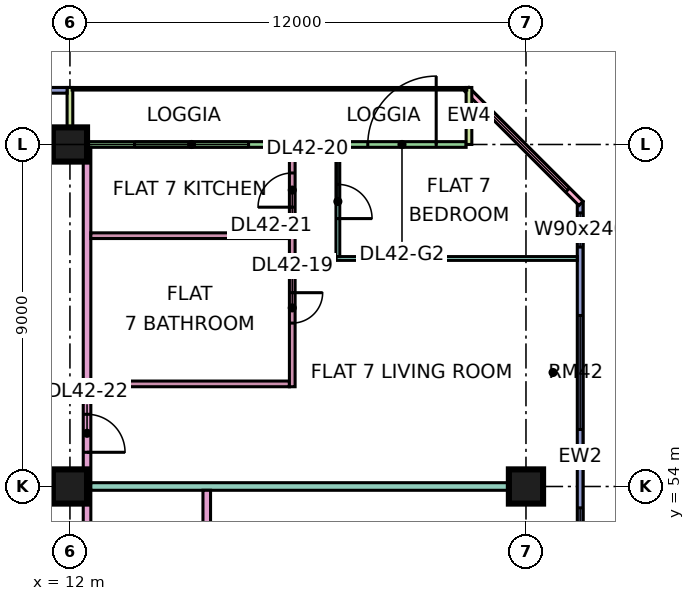
"""IFC4 building model, lengths in metres.
Left out: names, types, materials, properties, quantities, classifications, styles, units other than length and angle.
Written with IfcOpenShell. Run it as: python <this file> out.ifc"""

import sys

from ifc_helpers import new_model, si_unit, direction, frame, frame_2d, origin, origin_2d, place, context, subcontext, project, spatial, rectangle, extrude, element, fill, save


model = new_model("IFC4")
c1 = context("Model", 3, precision=1e-05, world=origin(), true_north=direction((0.0, 1.0)))
c2 = subcontext(c1, "Body", "Model", "MODEL_VIEW")
j1 = project(units=[si_unit("LENGTHUNIT", "METRE"), si_unit("PLANEANGLEUNIT", "RADIAN")], contexts=[c1])
p1 = place(None, origin())
s1 = spatial("IfcSite", under=j1, at=p1, CompositionType="ELEMENT")
p2 = place(p1, origin())
s2 = spatial("IfcBuilding", under=s1, at=p2, CompositionType="ELEMENT")
p3 = place(p2, frame((0.0, 0.0, 183.65)))
s3 = spatial("IfcBuildingStorey", under=s2, at=p3, CompositionType="ELEMENT", Elevation=183.65)
for number, where, z_axis, x_axis in (
    (1, (12.0, 54.0, 0.0), (0.0, 0.0, 1.0), (1.0, 0.0, 0.0)),
    (2, (12.0, 63.0, 0.0), (0.0, 0.0, 1.0), (1.0, 0.0, 0.0)),
    (3, (24.0, 54.0, 0.0), (0.0, 0.0, 1.0), (1.0, 0.0, 0.0)),
):
    element("IfcColumn", number, at=place(p3, frame(where, z_axis=z_axis, x_axis=x_axis)), inside=s3, PredefinedType="COLUMN", context=c2, shape_type="SweptSolid", body=[
        extrude(rectangle(XDim=0.9, YDim=0.9, at=origin_2d()), origin(), (0.0, 0.0, 1.0), 3.75),
    ])
p4 = place(p3, frame((25.425, 48.075, 0.0), z_axis=(0.0, 0.0, 1.0), x_axis=(0.0, 1.0, 0.0)))
e4 = element("IfcWall", 4, at=p4, inside=s3, PredefinedType="SOLIDWALL", context=c2, shape_type="SweptSolid", body=[
    extrude(rectangle(XDim=13.425, YDim=0.15, at=frame_2d((6.712, 0.0))), origin(), (0.0, 0.0, 1.0), 3.35),
])
p5 = place(p4, frame((0.562, 0.0, 0.45)))
e5 = element("IfcOpeningElement", 5, at=p5, cuts=e4, PredefinedType="OPENING", context=c2, shape_type="SweptSolid", body=[
    extrude(rectangle(XDim=4.8, YDim=2.4, at=frame_2d((2.4, 1.2))), frame((0.0, 0.085, 0.0), z_axis=(0.0, -1.0, 0.0), x_axis=(1.0, 0.0, 0.0)), (0.0, 0.0, 1.0), 0.17),
])
p6 = place(p4, frame((7.425, 0.0, 0.45)))
e6 = element("IfcOpeningElement", 6, at=p6, cuts=e4, PredefinedType="OPENING", context=c2, shape_type="SweptSolid", body=[
    extrude(rectangle(XDim=3.0, YDim=2.4, at=frame_2d((1.5, 1.2))), frame((0.0, 0.085, 0.0), z_axis=(0.0, -1.0, 0.0), x_axis=(1.0, 0.0, 0.0)), (0.0, 0.0, 1.0), 0.17),
])
p7 = place(p4, frame((12.225, 0.0, 0.45)))
e7 = element("IfcOpeningElement", 7, at=p7, cuts=e4, PredefinedType="OPENING", context=c2, shape_type="SweptSolid", body=[
    extrude(rectangle(XDim=0.9, YDim=2.4, at=frame_2d((0.45, 1.2))), frame((0.0, 0.085, 0.0), z_axis=(0.0, -1.0, 0.0), x_axis=(1.0, 0.0, 0.0)), (0.0, 0.0, 1.0), 0.17),
])
p8 = place(p3, frame((25.447, 61.447, 0.0), z_axis=(0.0, 0.0, 1.0), x_axis=(-0.707106781187, 0.707106781187, 0.0)))
e8 = element("IfcWall", 8, at=p8, inside=s3, PredefinedType="SOLIDWALL", context=c2, shape_type="SweptSolid", body=[
    extrude(rectangle(XDim=4.243, YDim=0.15, at=frame_2d((2.121, 0.0))), origin(), (0.0, 0.0, 1.0), 3.35),
])
p9 = place(p8, frame((0.498, 0.0, 0.45)))
e9 = element("IfcOpeningElement", 9, at=p9, cuts=e8, PredefinedType="OPENING", context=c2, shape_type="SweptSolid", body=[
    extrude(rectangle(XDim=3.0, YDim=2.4, at=frame_2d((1.5, 1.2))), frame((0.0, 0.085, 0.0), z_axis=(0.0, -1.0, 0.0), x_axis=(1.0, 0.0, 0.0)), (0.0, 0.0, 1.0), 0.17),
])
p10 = place(p3, frame((22.425, 63.0, 0.0), z_axis=(0.0, 0.0, 1.0), x_axis=(-1.0, 0.0, 0.0)))
e10 = element("IfcWall", 10, at=p10, inside=s3, PredefinedType="SOLIDWALL", context=c2, shape_type="SweptSolid", body=[
    extrude(rectangle(XDim=10.35, YDim=0.15, at=frame_2d((5.175, 0.0))), origin(), (0.0, 0.0, 1.0), 3.35),
])
p11 = place(p10, frame((0.788, 0.0, 0.0)))
e11 = element("IfcOpeningElement", 11, at=p11, cuts=e10, PredefinedType="OPENING", context=c2, shape_type="SweptSolid", body=[
    extrude(rectangle(XDim=1.8, YDim=2.4, at=frame_2d((0.9, 1.2))), frame((0.0, 0.085, 0.0), z_axis=(0.0, -1.0, 0.0), x_axis=(1.0, 0.0, 0.0)), (0.0, 0.0, 1.0), 0.17),
])
p12 = place(p10, frame((5.725, 0.0, 0.45)))
e12 = element("IfcOpeningElement", 12, at=p12, cuts=e10, PredefinedType="OPENING", context=c2, shape_type="SweptSolid", body=[
    extrude(rectangle(XDim=3.0, YDim=2.4, at=frame_2d((1.5, 1.2))), frame((0.0, 0.085, 0.0), z_axis=(0.0, -1.0, 0.0), x_axis=(1.0, 0.0, 0.0)), (0.0, 0.0, 1.0), 0.17),
])
for number, where, z_axis, x_axis in (
    (13, (22.5, 64.5, 0.0), (0.0, 0.0, 1.0), (0.0, -1.0, 0.0)),
    (14, (12.0, 64.5, 0.0), (0.0, 0.0, 1.0), (0.0, -1.0, 0.0)),
):
    element("IfcWall", number, at=place(p3, frame(where, z_axis=z_axis, x_axis=x_axis)), inside=s3, PredefinedType="SOLIDWALL", context=c2, shape_type="SweptSolid", body=[
        extrude(rectangle(XDim=1.5, YDim=0.15, at=frame_2d((0.75, 0.0))), origin(), (0.0, 0.0, 1.0), 3.35),
    ])
p13 = place(p3, frame((11.925, 64.425, 0.0), z_axis=(0.0, 0.0, 1.0), x_axis=(-1.0, 0.0, 0.0)))
e15 = element("IfcWall", 15, at=p13, inside=s3, PredefinedType="SOLIDWALL", context=c2, shape_type="SweptSolid", body=[
    extrude(rectangle(XDim=10.425, YDim=0.15, at=frame_2d((5.212, 0.0))), origin(), (0.0, 0.0, 1.0), 3.35),
])
p14 = place(p13, frame((6.675, 0.0, 0.45)))
e16 = element("IfcOpeningElement", 16, at=p14, cuts=e15, PredefinedType="OPENING", context=c2, shape_type="SweptSolid", body=[
    extrude(rectangle(XDim=3.0, YDim=2.4, at=frame_2d((1.5, 1.2))), frame((0.0, 0.085, 0.0), z_axis=(0.0, -1.0, 0.0), x_axis=(1.0, 0.0, 0.0)), (0.0, 0.0, 1.0), 0.17),
])
p15 = place(p3, frame((12.45, 20.0, 0.0), z_axis=(0.0, 0.0, 1.0), x_axis=(0.0, 1.0, 0.0)))
e17 = element("IfcWall", 17, at=p15, inside=s3, PredefinedType="PARTITIONING", context=c2, shape_type="SweptSolid", body=[
    extrude(rectangle(XDim=42.926, YDim=0.2, at=frame_2d((21.463, 0.0))), origin(), (0.0, 0.0, 1.0), 3.35),
])
p16 = place(p15, frame((5.95, 0.0, 0.0)))
e18 = element("IfcOpeningElement", 18, at=p16, cuts=e17, PredefinedType="OPENING", context=c2, shape_type="SweptSolid", body=[
    extrude(rectangle(XDim=1.0, YDim=2.1, at=frame_2d((0.5, 1.05))), frame((0.0, 0.11, 0.0), z_axis=(0.0, -1.0, 0.0), x_axis=(1.0, 0.0, 0.0)), (0.0, 0.0, 1.0), 0.22),
])
p17 = place(p15, frame((12.0, 0.0, 0.0)))
e19 = element("IfcOpeningElement", 19, at=p17, cuts=e17, PredefinedType="OPENING", context=c2, shape_type="SweptSolid", body=[
    extrude(rectangle(XDim=1.0, YDim=2.1, at=frame_2d((0.5, 1.05))), frame((0.0, 0.11, 0.0), z_axis=(0.0, -1.0, 0.0), x_axis=(1.0, 0.0, 0.0)), (0.0, 0.0, 1.0), 0.22),
])
p18 = place(p15, frame((16.9, 0.0, 0.0)))
e20 = element("IfcOpeningElement", 20, at=p18, cuts=e17, PredefinedType="OPENING", context=c2, shape_type="SweptSolid", body=[
    extrude(rectangle(XDim=1.0, YDim=2.1, at=frame_2d((0.5, 1.05))), frame((0.0, 0.11, 0.0), z_axis=(0.0, -1.0, 0.0), x_axis=(1.0, 0.0, 0.0)), (0.0, 0.0, 1.0), 0.22),
])
p19 = place(p15, frame((34.9, 0.0, 0.0)))
e21 = element("IfcOpeningElement", 21, at=p19, cuts=e17, PredefinedType="OPENING", context=c2, shape_type="SweptSolid", body=[
    extrude(rectangle(XDim=1.0, YDim=2.1, at=frame_2d((0.5, 1.05))), frame((0.0, 0.11, 0.0), z_axis=(0.0, -1.0, 0.0), x_axis=(1.0, 0.0, 0.0)), (0.0, 0.0, 1.0), 0.22),
])
p20 = place(p15, frame((1.15, 0.0, 0.0)))
e22 = element("IfcOpeningElement", 22, at=p20, cuts=e17, PredefinedType="OPENING", context=c2, shape_type="SweptSolid", body=[
    extrude(rectangle(XDim=1.8, YDim=2.1, at=frame_2d((0.9, 1.05))), frame((0.0, 0.11, 0.0), z_axis=(0.0, -1.0, 0.0), x_axis=(1.0, 0.0, 0.0)), (0.0, 0.0, 1.0), 0.22),
])
p21 = place(p15, frame((28.6, 0.0, 0.0)))
e23 = element("IfcOpeningElement", 23, at=p21, cuts=e17, PredefinedType="OPENING", context=c2, shape_type="SweptSolid", body=[
    extrude(rectangle(XDim=1.8, YDim=2.1, at=frame_2d((0.9, 1.05))), frame((0.0, 0.11, 0.0), z_axis=(0.0, -1.0, 0.0), x_axis=(1.0, 0.0, 0.0)), (0.0, 0.0, 1.0), 0.22),
])
p22 = place(p3, frame((12.55, 54.0, 0.0), z_axis=(0.0, 0.0, 1.0), x_axis=(1.0, 0.0, 0.0)))
e24 = element("IfcWall", 24, at=p22, inside=s3, PredefinedType="PARTITIONING", context=c2, shape_type="SweptSolid", body=[
    extrude(rectangle(XDim=11.45, YDim=0.2, at=frame_2d((5.725, 0.0))), origin(), (0.0, 0.0, 1.0), 3.35),
])
for number, where, z_axis, x_axis in (
    (25, (12.55, 56.7, 0.0), (0.0, 0.0, 1.0), (1.0, 0.0, 0.0)),
    (26, (12.55, 60.6, 0.0), (0.0, 0.0, 1.0), (1.0, 0.0, 0.0)),
):
    element("IfcWall", number, at=place(p3, frame(where, z_axis=z_axis, x_axis=x_axis)), inside=s3, PredefinedType="PARTITIONING", context=c2, shape_type="SweptSolid", body=[
        extrude(rectangle(XDim=5.225, YDim=0.15, at=frame_2d((2.612, 0.0))), origin(), (0.0, 0.0, 1.0), 3.35),
    ])
p23 = place(p3, frame((15.6, 51.225, 0.0), z_axis=(0.0, 0.0, 1.0), x_axis=(0.0, 1.0, 0.0)))
e27 = element("IfcWall", 27, at=p23, inside=s3, PredefinedType="PARTITIONING", context=c2, shape_type="SweptSolid", body=[
    extrude(rectangle(XDim=2.675, YDim=0.2, at=frame_2d((1.337, 0.0))), origin(), (0.0, 0.0, 1.0), 3.35),
])
p24 = place(p3, frame((17.85, 56.625, 0.0), z_axis=(0.0, 0.0, 1.0), x_axis=(0.0, 1.0, 0.0)))
e28 = element("IfcWall", 28, at=p24, inside=s3, PredefinedType="PARTITIONING", context=c2, shape_type="SweptSolid", body=[
    extrude(rectangle(XDim=6.301, YDim=0.15, at=frame_2d((3.15, 0.0))), origin(), (0.0, 0.0, 1.0), 3.35),
])
p25 = place(p24, frame((1.675, 0.0, 0.0)))
e29 = element("IfcOpeningElement", 29, at=p25, cuts=e28, PredefinedType="OPENING", context=c2, shape_type="SweptSolid", body=[
    extrude(rectangle(XDim=0.8, YDim=2.1, at=frame_2d((0.4, 1.05))), frame((0.0, 0.085, 0.0), z_axis=(0.0, -1.0, 0.0), x_axis=(1.0, 0.0, 0.0)), (0.0, 0.0, 1.0), 0.17),
])
p26 = place(p24, frame((4.725, 0.0, 0.0)))
e30 = element("IfcOpeningElement", 30, at=p26, cuts=e28, PredefinedType="OPENING", context=c2, shape_type="SweptSolid", body=[
    extrude(rectangle(XDim=0.9, YDim=2.1, at=frame_2d((0.45, 1.05))), frame((0.0, 0.085, 0.0), z_axis=(0.0, -1.0, 0.0), x_axis=(1.0, 0.0, 0.0)), (0.0, 0.0, 1.0), 0.17),
])
p27 = place(p3, frame((19.0, 60.0, 0.0), z_axis=(0.0, 0.0, 1.0), x_axis=(1.0, 0.0, 0.0)))
e31 = element("IfcWall", 31, at=p27, inside=s3, PredefinedType="PARTITIONING", context=c2, shape_type="SweptSolid", body=[
    extrude(rectangle(XDim=6.35, YDim=0.1, at=frame_2d((3.175, 0.0))), origin(), (0.0, 0.0, 1.0), 3.35),
])
p28 = place(p3, frame((19.05, 60.05, 0.0), z_axis=(0.0, 0.0, 1.0), x_axis=(0.0, 1.0, 0.0)))
e32 = element("IfcWall", 32, at=p28, inside=s3, PredefinedType="PARTITIONING", context=c2, shape_type="SweptSolid", body=[
    extrude(rectangle(XDim=2.876, YDim=0.1, at=frame_2d((1.438, 0.0))), origin(), (0.0, 0.0, 1.0), 3.35),
])
p29 = place(p28, frame((1.0, 0.0, 0.0)))
e33 = element("IfcOpeningElement", 33, at=p29, cuts=e32, PredefinedType="OPENING", context=c2, shape_type="SweptSolid", body=[
    extrude(rectangle(XDim=0.9, YDim=2.1, at=frame_2d((0.45, 1.05))), frame((0.0, 0.06, 0.0), z_axis=(0.0, -1.0, 0.0), x_axis=(1.0, 0.0, 0.0)), (0.0, 0.0, 1.0), 0.12),
])
p30 = place(p5, origin())
e34 = element("IfcWindow", 34, at=p30, inside=s3, PartitioningType="SINGLE_PANEL", PredefinedType="WINDOW", context=c2, shape_type="SweptSolid", body=[
    extrude(rectangle(XDim=4.8, YDim=2.4, at=frame_2d((2.4, 1.2))), frame((0.0, 0.03, 0.0), z_axis=(0.0, -1.0, 0.0), x_axis=(1.0, 0.0, 0.0)), (0.0, 0.0, 1.0), 0.06),
])
fill(e5, e34)
p31 = place(p6, origin())
e35 = element("IfcWindow", 35, at=p31, inside=s3, PartitioningType="SINGLE_PANEL", PredefinedType="WINDOW", context=c2, shape_type="SweptSolid", body=[
    extrude(rectangle(XDim=3.0, YDim=2.4, at=frame_2d((1.5, 1.2))), frame((0.0, 0.03, 0.0), z_axis=(0.0, -1.0, 0.0), x_axis=(1.0, 0.0, 0.0)), (0.0, 0.0, 1.0), 0.06),
])
fill(e6, e35)
p32 = place(p7, origin())
e36 = element("IfcWindow", 36, at=p32, inside=s3, PartitioningType="SINGLE_PANEL", PredefinedType="WINDOW", context=c2, shape_type="SweptSolid", body=[
    extrude(rectangle(XDim=0.9, YDim=2.4, at=frame_2d((0.45, 1.2))), frame((0.0, 0.03, 0.0), z_axis=(0.0, -1.0, 0.0), x_axis=(1.0, 0.0, 0.0)), (0.0, 0.0, 1.0), 0.06),
])
fill(e7, e36)
p33 = place(p9, origin())
e37 = element("IfcWindow", 37, at=p33, inside=s3, PartitioningType="SINGLE_PANEL", PredefinedType="WINDOW", context=c2, shape_type="SweptSolid", body=[
    extrude(rectangle(XDim=3.0, YDim=2.4, at=frame_2d((1.5, 1.2))), frame((0.0, 0.03, 0.0), z_axis=(0.0, -1.0, 0.0), x_axis=(1.0, 0.0, 0.0)), (0.0, 0.0, 1.0), 0.06),
])
fill(e9, e37)
p34 = place(p11, frame((1.8, 0.0, 0.0), z_axis=(0.0, 0.0, 1.0), x_axis=(-1.0, 0.0, 0.0)))
e38 = element("IfcDoor", 38, at=p34, inside=s3, OperationType="DOUBLE_DOOR_SINGLE_SWING", PredefinedType="DOOR", context=c2, shape_type="SweptSolid", body=[
    extrude(rectangle(XDim=1.8, YDim=2.4, at=frame_2d((0.9, 1.2))), frame((0.0, 0.025, 0.0), z_axis=(0.0, -1.0, 0.0), x_axis=(1.0, 0.0, 0.0)), (0.0, 0.0, 1.0), 0.05),
])
fill(e11, e38)
p35 = place(p12, origin())
e39 = element("IfcWindow", 39, at=p35, inside=s3, PartitioningType="SINGLE_PANEL", PredefinedType="WINDOW", context=c2, shape_type="SweptSolid", body=[
    extrude(rectangle(XDim=3.0, YDim=2.4, at=frame_2d((1.5, 1.2))), frame((0.0, 0.03, 0.0), z_axis=(0.0, -1.0, 0.0), x_axis=(1.0, 0.0, 0.0)), (0.0, 0.0, 1.0), 0.06),
])
fill(e12, e39)
p36 = place(p25, origin())
e40 = element("IfcDoor", 40, at=p36, inside=s3, OperationType="SINGLE_SWING_RIGHT", PredefinedType="DOOR", context=c2, shape_type="SweptSolid", body=[
    extrude(rectangle(XDim=0.8, YDim=2.1, at=frame_2d((0.4, 1.05))), frame((0.0, 0.025, 0.0), z_axis=(0.0, -1.0, 0.0), x_axis=(1.0, 0.0, 0.0)), (0.0, 0.0, 1.0), 0.05),
])
fill(e29, e40)
p37 = place(p29, frame((0.9, 0.0, 0.0), z_axis=(0.0, 0.0, 1.0), x_axis=(-1.0, 0.0, 0.0)))
e41 = element("IfcDoor", 41, at=p37, inside=s3, OperationType="SINGLE_SWING_LEFT", PredefinedType="DOOR", context=c2, shape_type="SweptSolid", body=[
    extrude(rectangle(XDim=0.9, YDim=2.1, at=frame_2d((0.45, 1.05))), frame((0.0, 0.025, 0.0), z_axis=(0.0, -1.0, 0.0), x_axis=(1.0, 0.0, 0.0)), (0.0, 0.0, 1.0), 0.05),
])
fill(e33, e41)
p38 = place(p26, origin())
e42 = element("IfcDoor", 42, at=p38, inside=s3, OperationType="SINGLE_SWING_LEFT", PredefinedType="DOOR", context=c2, shape_type="SweptSolid", body=[
    extrude(rectangle(XDim=0.9, YDim=2.1, at=frame_2d((0.45, 1.05))), frame((0.0, 0.025, 0.0), z_axis=(0.0, -1.0, 0.0), x_axis=(1.0, 0.0, 0.0)), (0.0, 0.0, 1.0), 0.05),
])
fill(e30, e42)
p39 = place(p19, frame((1.0, 0.0, 0.0), z_axis=(0.0, 0.0, 1.0), x_axis=(-1.0, 0.0, 0.0)))
e43 = element("IfcDoor", 43, at=p39, inside=s3, OperationType="SINGLE_SWING_LEFT", PredefinedType="DOOR", context=c2, shape_type="SweptSolid", body=[
    extrude(rectangle(XDim=1.0, YDim=2.1, at=frame_2d((0.5, 1.05))), frame((0.0, 0.025, 0.0), z_axis=(0.0, -1.0, 0.0), x_axis=(1.0, 0.0, 0.0)), (0.0, 0.0, 1.0), 0.05),
])
fill(e21, e43)
save(model, sys.argv[1])
